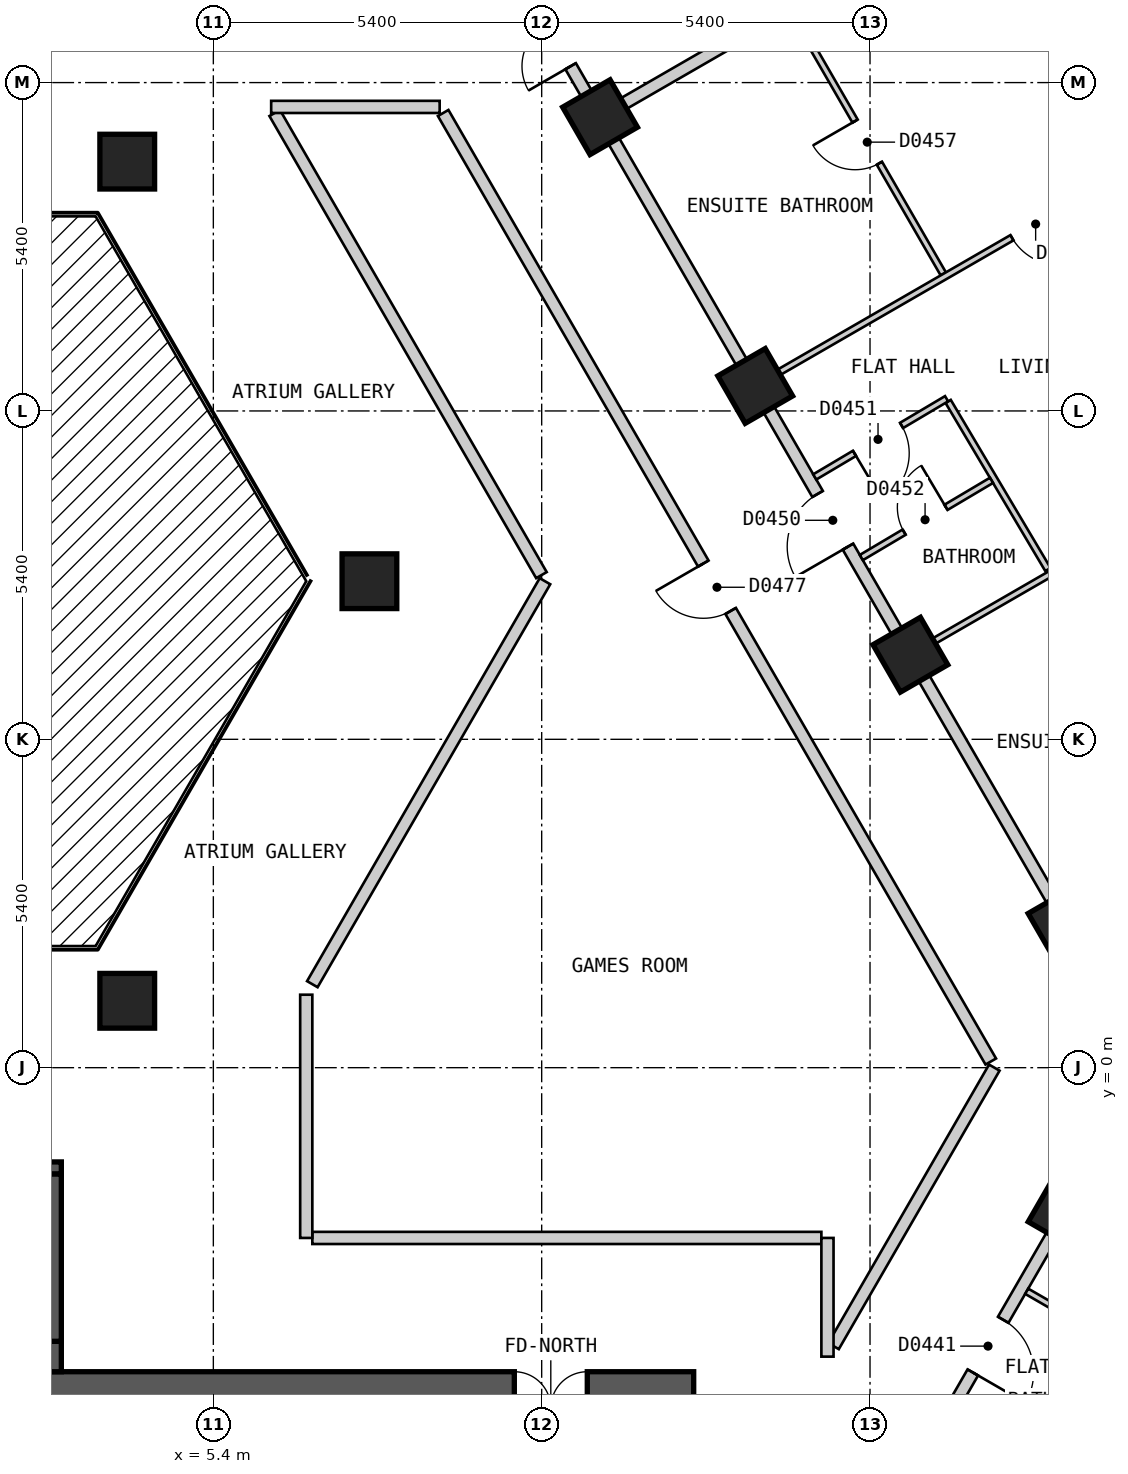
"""IFC4 building model, lengths in metres.
Left out: names, types, materials, properties, quantities, classifications, styles, units other than length and angle.
Written with IfcOpenShell. Run it as: python <this file> out.ifc"""

import sys

from ifc_helpers import new_model, si_unit, direction, frame, frame_2d, origin, origin_2d, place, context, subcontext, project, spatial, polyline, rectangle, outline, extrude, element, fill, save


model = new_model("IFC4")
c1 = context("Model", 3, precision=1e-05, world=origin(), true_north=direction((0.0, 1.0)))
c2 = subcontext(c1, "Body", "Model", "MODEL_VIEW")
j1 = project(units=[si_unit("LENGTHUNIT", "METRE"), si_unit("PLANEANGLEUNIT", "RADIAN")], contexts=[c1])
p1 = place(None, origin())
s1 = spatial("IfcSite", under=j1, at=p1, CompositionType="ELEMENT")
p2 = place(p1, origin())
s2 = spatial("IfcBuilding", under=s1, at=p2, CompositionType="ELEMENT")
p3 = place(p2, frame((0.0, 0.0, 38.4)))
s3 = spatial("IfcBuildingStorey", under=s2, at=p3, CompositionType="ELEMENT", Elevation=38.4)
for number, where, z_axis, x_axis in (
    (1, (19.417, -2.369, 0.0), (0.0, 0.0, 1.0), (0.5, 0.866, 0.0)),
    (2, (19.416, 2.371, 0.0), (0.0, 0.0, 1.0), (-0.5, 0.866, 0.0)),
    (3, (3.984, 1.1, 0.0), (0.0, 0.0, 1.0), (1.0, 0.0, 0.0)),
    (4, (16.864, 6.791, 0.0), (0.0, 0.0, 1.0), (-0.5, 0.866, 0.0)),
    (5, (14.312, 11.211, 0.0), (0.0, 0.0, 1.0), (-0.5, 0.866, 0.0)),
    (6, (7.967, 8.0, 0.0), (0.0, 0.0, 1.0), (1.0, 0.0, 0.0)),
    (7, (11.76, 15.631, 0.0), (0.0, 0.0, 1.0), (-0.5, 0.866, 0.0)),
    (8, (3.984, 14.9, 0.0), (0.0, 0.0, 1.0), (1.0, 0.0, 0.0)),
):
    element("IfcColumn", number, at=place(p3, frame(where, z_axis=z_axis, x_axis=x_axis)), inside=s3, PredefinedType="COLUMN", context=c2, shape_type="SweptSolid", body=[
        extrude(rectangle(XDim=0.9, YDim=0.9, at=origin_2d()), origin(), (0.0, 0.0, 1.0), 3.0),
    ])
p4 = place(p3, frame((-13.3, -5.6, 0.0), z_axis=(0.0, 0.0, 1.0), x_axis=(1.0, 0.0, 0.0)))
e9 = element("IfcWall", 9, at=p4, inside=s3, PredefinedType="SHEAR", context=c2, shape_type="SweptSolid", body=[
    extrude(rectangle(XDim=26.6, YDim=1.2, at=frame_2d((13.3, 0.0))), origin(), (0.0, 0.0, 1.0), 2.7),
])
p5 = place(p4, frame((23.65, 0.0, 0.0)))
e10 = element("IfcOpeningElement", 10, at=p5, cuts=e9, PredefinedType="OPENING", context=c2, shape_type="SweptSolid", body=[
    extrude(rectangle(XDim=1.2, YDim=2.1, at=frame_2d((0.6, 1.05))), frame((0.0, 0.61, 0.0), z_axis=(0.0, -1.0, 0.0), x_axis=(1.0, 0.0, 0.0)), (0.0, 0.0, 1.0), 1.22),
])
p6 = place(p3, frame((17.71, -25.825, 0.0), z_axis=(0.0, 0.0, 1.0), x_axis=(0.500001938803, 0.866024284413, 0.0)))
e11 = element("IfcWall", 11, at=p6, inside=s3, PredefinedType="SOLIDWALL", context=c2, shape_type="SweptSolid", body=[
    extrude(outline(polyline([(0.0, -0.15), (27.02, -0.15), (26.94, 0.15), (0.08, 0.15), (0.0, -0.15)])), origin(), (0.0, 0.0, 1.0), 2.7),
])
p7 = place(p6, frame((2.553, 0.0, 0.15)))
e12 = element("IfcOpeningElement", 12, at=p7, cuts=e11, PredefinedType="OPENING", context=c2, shape_type="SweptSolid", body=[
    extrude(rectangle(XDim=1.5, YDim=2.1, at=frame_2d((0.75, 1.05))), frame((0.0, 0.16, 0.0), z_axis=(0.0, -1.0, 0.0), x_axis=(1.0, 0.0, 0.0)), (0.0, 0.0, 1.0), 0.32),
])
p8 = place(p6, frame((7.658, 0.0, 0.15)))
e13 = element("IfcOpeningElement", 13, at=p8, cuts=e11, PredefinedType="OPENING", context=c2, shape_type="SweptSolid", body=[
    extrude(rectangle(XDim=1.5, YDim=2.1, at=frame_2d((0.75, 1.05))), frame((0.0, 0.16, 0.0), z_axis=(0.0, -1.0, 0.0), x_axis=(1.0, 0.0, 0.0)), (0.0, 0.0, 1.0), 0.32),
])
p9 = place(p6, frame((12.761, 0.0, 0.15)))
e14 = element("IfcOpeningElement", 14, at=p9, cuts=e11, PredefinedType="OPENING", context=c2, shape_type="SweptSolid", body=[
    extrude(rectangle(XDim=1.5, YDim=2.1, at=frame_2d((0.75, 1.05))), frame((0.0, 0.16, 0.0), z_axis=(0.0, -1.0, 0.0), x_axis=(1.0, 0.0, 0.0)), (0.0, 0.0, 1.0), 0.32),
])
p10 = place(p6, frame((17.865, 0.0, 0.15)))
e15 = element("IfcOpeningElement", 15, at=p10, cuts=e11, PredefinedType="OPENING", context=c2, shape_type="SweptSolid", body=[
    extrude(rectangle(XDim=1.5, YDim=2.1, at=frame_2d((0.75, 1.05))), frame((0.0, 0.16, 0.0), z_axis=(0.0, -1.0, 0.0), x_axis=(1.0, 0.0, 0.0)), (0.0, 0.0, 1.0), 0.32),
])
p11 = place(p6, frame((22.969, 0.0, 0.15)))
e16 = element("IfcOpeningElement", 16, at=p11, cuts=e11, PredefinedType="OPENING", context=c2, shape_type="SweptSolid", body=[
    extrude(rectangle(XDim=1.5, YDim=2.1, at=frame_2d((0.75, 1.05))), frame((0.0, 0.16, 0.0), z_axis=(0.0, -1.0, 0.0), x_axis=(1.0, 0.0, 0.0)), (0.0, 0.0, 1.0), 0.32),
])
p12 = place(p3, frame((31.22, 2.425, 0.0), z_axis=(0.0, 0.0, 1.0), x_axis=(-0.500001938803, 0.866024284413, 0.0)))
e17 = element("IfcWall", 17, at=p12, inside=s3, PredefinedType="SOLIDWALL", context=c2, shape_type="SweptSolid", body=[
    extrude(outline(polyline([(0.0, -0.15), (27.02, -0.15), (26.94, 0.15), (0.08, 0.15), (0.0, -0.15)])), origin(), (0.0, 0.0, 1.0), 2.7),
])
p13 = place(p12, frame((2.553, 0.0, 0.15)))
e18 = element("IfcOpeningElement", 18, at=p13, cuts=e17, PredefinedType="OPENING", context=c2, shape_type="SweptSolid", body=[
    extrude(rectangle(XDim=1.5, YDim=2.1, at=frame_2d((0.75, 1.05))), frame((0.0, 0.16, 0.0), z_axis=(0.0, -1.0, 0.0), x_axis=(1.0, 0.0, 0.0)), (0.0, 0.0, 1.0), 0.32),
])
p14 = place(p12, frame((7.657, 0.0, 0.15)))
e19 = element("IfcOpeningElement", 19, at=p14, cuts=e17, PredefinedType="OPENING", context=c2, shape_type="SweptSolid", body=[
    extrude(rectangle(XDim=1.5, YDim=2.1, at=frame_2d((0.75, 1.05))), frame((0.0, 0.16, 0.0), z_axis=(0.0, -1.0, 0.0), x_axis=(1.0, 0.0, 0.0)), (0.0, 0.0, 1.0), 0.32),
])
p15 = place(p12, frame((12.761, 0.0, 0.15)))
e20 = element("IfcOpeningElement", 20, at=p15, cuts=e17, PredefinedType="OPENING", context=c2, shape_type="SweptSolid", body=[
    extrude(rectangle(XDim=1.5, YDim=2.1, at=frame_2d((0.75, 1.05))), frame((0.0, 0.16, 0.0), z_axis=(0.0, -1.0, 0.0), x_axis=(1.0, 0.0, 0.0)), (0.0, 0.0, 1.0), 0.32),
])
p16 = place(p12, frame((17.865, 0.0, 0.15)))
e21 = element("IfcOpeningElement", 21, at=p16, cuts=e17, PredefinedType="OPENING", context=c2, shape_type="SweptSolid", body=[
    extrude(rectangle(XDim=1.5, YDim=2.1, at=frame_2d((0.75, 1.05))), frame((0.0, 0.16, 0.0), z_axis=(0.0, -1.0, 0.0), x_axis=(1.0, 0.0, 0.0)), (0.0, 0.0, 1.0), 0.32),
])
p17 = place(p12, frame((22.969, 0.0, 0.15)))
e22 = element("IfcOpeningElement", 22, at=p17, cuts=e17, PredefinedType="OPENING", context=c2, shape_type="SweptSolid", body=[
    extrude(rectangle(XDim=1.5, YDim=2.1, at=frame_2d((0.75, 1.05))), frame((0.0, 0.16, 0.0), z_axis=(0.0, -1.0, 0.0), x_axis=(1.0, 0.0, 0.0)), (0.0, 0.0, 1.0), 0.32),
])
p18 = place(p3, frame((-2.9, -4.75, 0.0), z_axis=(0.0, 0.0, 1.0), x_axis=(1.0, 0.0, 0.0)))
e23 = element("IfcWall", 23, at=p18, inside=s3, PredefinedType="SOLIDWALL", context=c2, shape_type="SweptSolid", body=[
    extrude(rectangle(XDim=5.8, YDim=0.5, at=frame_2d((2.9, 0.0))), origin(), (0.0, 0.0, 1.0), 2.7),
])
p19 = place(p3, frame((-2.9, -1.65, 0.0), z_axis=(0.0, 0.0, 1.0), x_axis=(1.0, 0.0, 0.0)))
e24 = element("IfcWall", 24, at=p19, inside=s3, PredefinedType="SOLIDWALL", context=c2, shape_type="SweptSolid", body=[
    extrude(rectangle(XDim=5.8, YDim=0.2, at=frame_2d((2.9, 0.0))), origin(), (0.0, 0.0, 1.0), 2.7),
])
p20 = place(p19, frame((0.3, 0.0, 0.0)))
e25 = element("IfcOpeningElement", 25, at=p20, cuts=e24, PredefinedType="OPENING", context=c2, shape_type="SweptSolid", body=[
    extrude(rectangle(XDim=1.2, YDim=2.1, at=frame_2d((0.6, 1.05))), frame((0.0, 0.11, 0.0), z_axis=(0.0, -1.0, 0.0), x_axis=(1.0, 0.0, 0.0)), (0.0, 0.0, 1.0), 0.22),
])
p21 = place(p3, frame((2.8, -4.5, 0.0), z_axis=(0.0, 0.0, 1.0), x_axis=(0.0, 1.0, 0.0)))
e26 = element("IfcWall", 26, at=p21, inside=s3, PredefinedType="SOLIDWALL", context=c2, shape_type="SweptSolid", body=[
    extrude(rectangle(XDim=2.75, YDim=0.2, at=frame_2d((1.375, 0.0))), origin(), (0.0, 0.0, 1.0), 2.7),
])
p22 = place(p3, frame((6.409, 15.7, 0.0), z_axis=(0.0, 0.0, 1.0), x_axis=(0.499930377127, -0.866065596838, 0.0)))
e27 = element("IfcWall", 27, at=p22, inside=s3, PredefinedType="PARTITIONING", context=c2, shape_type="SweptSolid", body=[
    extrude(rectangle(XDim=8.775, YDim=0.2, at=frame_2d((4.388, 0.0))), origin(), (0.0, 0.0, 1.0), 2.7),
])
p23 = place(p3, frame((9.18, 15.7, 0.0), z_axis=(0.0, 0.0, 1.0), x_axis=(0.500003652032, -0.866023295272, 0.0)))
e28 = element("IfcWall", 28, at=p23, inside=s3, PredefinedType="PARTITIONING", context=c2, shape_type="SweptSolid", body=[
    extrude(rectangle(XDim=18.012, YDim=0.2, at=frame_2d((9.006, 0.0))), origin(), (0.0, 0.0, 1.0), 2.7),
])
p24 = place(p23, frame((8.556, 0.0, 0.0)))
e29 = element("IfcOpeningElement", 29, at=p24, cuts=e28, PredefinedType="OPENING", context=c2, shape_type="SweptSolid", body=[
    extrude(rectangle(XDim=0.9, YDim=2.1, at=frame_2d((0.45, 1.05))), frame((0.0, 0.11, 0.0), z_axis=(0.0, -1.0, 0.0), x_axis=(1.0, 0.0, 0.0)), (0.0, 0.0, 1.0), 0.22),
])
p25 = place(p3, frame((10.45, 17.9, 0.0), z_axis=(0.0, 0.0, 1.0), x_axis=(0.500034352617, -0.866005569383, 0.0)))
e30 = element("IfcWall", 30, at=p25, inside=s3, PredefinedType="PARTITIONING", context=c2, shape_type="SweptSolid", body=[
    extrude(rectangle(XDim=20.553, YDim=0.2, at=frame_2d((10.276, 0.0))), origin(), (0.0, 0.0, 1.0), 2.7),
])
p26 = place(p25, frame((9.775, 0.0, 0.0)))
e31 = element("IfcOpeningElement", 31, at=p26, cuts=e30, PredefinedType="OPENING", context=c2, shape_type="SweptSolid", body=[
    extrude(rectangle(XDim=1.0, YDim=2.1, at=frame_2d((0.5, 1.05))), frame((0.0, 0.11, 0.0), z_axis=(0.0, -1.0, 0.0), x_axis=(1.0, 0.0, 0.0)), (0.0, 0.0, 1.0), 0.22),
])
p27 = place(p25, frame((0.852, 0.0, 0.0)))
e32 = element("IfcOpeningElement", 32, at=p27, cuts=e30, PredefinedType="OPENING", context=c2, shape_type="SweptSolid", body=[
    extrude(rectangle(XDim=0.8, YDim=2.1, at=frame_2d((0.4, 1.05))), frame((0.0, 0.11, 0.0), z_axis=(0.0, -1.0, 0.0), x_axis=(1.0, 0.0, 0.0)), (0.0, 0.0, 1.0), 0.22),
])
p28 = place(p3, frame((7.028, -2.8, 0.0), z_axis=(0.0, 0.0, 1.0), x_axis=(1.0, 0.0, 0.0)))
e33 = element("IfcWall", 33, at=p28, inside=s3, PredefinedType="PARTITIONING", context=c2, shape_type="SweptSolid", body=[
    extrude(rectangle(XDim=8.372, YDim=0.2, at=frame_2d((4.186, 0.0))), origin(), (0.0, 0.0, 1.0), 2.7),
])
p29 = place(p3, frame((6.351, 15.8, 0.0), z_axis=(0.0, 0.0, 1.0), x_axis=(1.0, 0.0, 0.0)))
e34 = element("IfcWall", 34, at=p29, inside=s3, PredefinedType="PARTITIONING", context=c2, shape_type="SweptSolid", body=[
    extrude(rectangle(XDim=2.771, YDim=0.2, at=frame_2d((1.385, 0.0))), origin(), (0.0, 0.0, 1.0), 2.7),
])
p30 = place(p3, frame((7.028, 1.373, 0.0), z_axis=(0.0, 0.0, 1.0), x_axis=(0.49998574534, 0.86603363356, 0.0)))
e35 = element("IfcWall", 35, at=p30, inside=s3, PredefinedType="PARTITIONING", context=c2, shape_type="SweptSolid", body=[
    extrude(rectangle(XDim=7.652, YDim=0.2, at=frame_2d((3.826, 0.0))), origin(), (0.0, 0.0, 1.0), 2.7),
])
p31 = place(p3, frame((15.6, -4.579, 0.0), z_axis=(0.0, 0.0, 1.0), x_axis=(0.499927597274, 0.866067201483, 0.0)))
e36 = element("IfcWall", 36, at=p31, inside=s3, PredefinedType="PARTITIONING", context=c2, shape_type="SweptSolid", body=[
    extrude(rectangle(XDim=5.288, YDim=0.2, at=frame_2d((2.644, 0.0))), origin(), (0.0, 0.0, 1.0), 2.7),
])
p32 = place(p3, frame((15.707, -8.794, 0.0), z_axis=(0.0, 0.0, 1.0), x_axis=(0.500016151272, 0.866016078642, 0.0)))
e37 = element("IfcWall", 37, at=p32, inside=s3, PredefinedType="PARTITIONING", context=c2, shape_type="SweptSolid", body=[
    extrude(rectangle(XDim=10.098, YDim=0.2, at=frame_2d((5.049, 0.0))), origin(), (0.0, 0.0, 1.0), 2.7),
])
p33 = place(p32, frame((4.367, 0.0, 0.0)))
e38 = element("IfcOpeningElement", 38, at=p33, cuts=e37, PredefinedType="OPENING", context=c2, shape_type="SweptSolid", body=[
    extrude(rectangle(XDim=1.0, YDim=2.1, at=frame_2d((0.5, 1.05))), frame((0.0, 0.11, 0.0), z_axis=(0.0, -1.0, 0.0), x_axis=(1.0, 0.0, 0.0)), (0.0, 0.0, 1.0), 0.22),
])
p34 = place(p3, frame((6.928, -2.8, 0.0), z_axis=(0.0, 0.0, 1.0), x_axis=(0.0, 1.0, 0.0)))
e39 = element("IfcWall", 39, at=p34, inside=s3, PredefinedType="PARTITIONING", context=c2, shape_type="SweptSolid", body=[
    extrude(rectangle(XDim=4.0, YDim=0.2, at=frame_2d((2.0, 0.0))), origin(), (0.0, 0.0, 1.0), 2.7),
])
p35 = place(p3, frame((15.5, -4.752, 0.0), z_axis=(0.0, 0.0, 1.0), x_axis=(0.0, 1.0, 0.0)))
e40 = element("IfcWall", 40, at=p35, inside=s3, PredefinedType="PARTITIONING", context=c2, shape_type="SweptSolid", body=[
    extrude(rectangle(XDim=1.952, YDim=0.2, at=frame_2d((0.976, 0.0))), origin(), (0.0, 0.0, 1.0), 2.7),
])
p36 = place(p3, frame((17.485, 10.957, 0.0), z_axis=(0.0, 0.0, 1.0), x_axis=(0.510324709283, -0.859981796956, 0.0)))
e41 = element("IfcWall", 41, at=p36, inside=s3, PredefinedType="PARTITIONING", context=c2, shape_type="SweptSolid", body=[
    extrude(rectangle(XDim=3.215, YDim=0.1, at=frame_2d((1.608, 0.0))), origin(), (0.0, 0.0, 1.0), 2.7),
])
p37 = place(p3, frame((14.928, 17.344, 0.0), z_axis=(0.0, 0.0, 1.0), x_axis=(0.500029609304, -0.86600830817, 0.0)))
e42 = element("IfcWall", 42, at=p37, inside=s3, PredefinedType="PARTITIONING", context=c2, shape_type="SweptSolid", body=[
    extrude(rectangle(XDim=4.954, YDim=0.1, at=frame_2d((2.477, 0.0))), origin(), (0.0, 0.0, 1.0), 2.7),
])
p38 = place(p37, frame((2.052, 0.0, 0.0)))
e43 = element("IfcOpeningElement", 43, at=p38, cuts=e42, PredefinedType="OPENING", context=c2, shape_type="SweptSolid", body=[
    extrude(rectangle(XDim=0.8, YDim=2.1, at=frame_2d((0.4, 1.05))), frame((0.0, 0.06, 0.0), z_axis=(0.0, -1.0, 0.0), x_axis=(1.0, 0.0, 0.0)), (0.0, 0.0, 1.0), 0.12),
])
p39 = place(p3, frame((18.777, -3.677, 0.0), z_axis=(0.0, 0.0, 1.0), x_axis=(0.866000843773, -0.500042536776, 0.0)))
e44 = element("IfcWall", 44, at=p39, inside=s3, PredefinedType="PARTITIONING", context=c2, shape_type="SweptSolid", body=[
    extrude(rectangle(XDim=4.05, YDim=0.1, at=frame_2d((2.025, 0.0))), origin(), (0.0, 0.0, 1.0), 2.7),
])
p40 = place(p39, frame((1.55, 0.0, 0.0)))
e45 = element("IfcOpeningElement", 45, at=p40, cuts=e44, PredefinedType="OPENING", context=c2, shape_type="SweptSolid", body=[
    extrude(rectangle(XDim=0.9, YDim=2.1, at=frame_2d((0.45, 1.05))), frame((0.0, 0.06, 0.0), z_axis=(0.0, -1.0, 0.0), x_axis=(1.0, 0.0, 0.0)), (0.0, 0.0, 1.0), 0.12),
])
p41 = place(p3, frame((16.95, 6.841, 0.0), z_axis=(0.0, 0.0, 1.0), x_axis=(0.866022959057, 0.500004234368, 0.0)))
e46 = element("IfcWall", 46, at=p41, inside=s3, PredefinedType="PARTITIONING", context=c2, shape_type="SweptSolid", body=[
    extrude(rectangle(XDim=10.0, YDim=0.1, at=frame_2d((5.0, 0.0))), origin(), (0.0, 0.0, 1.0), 2.7),
])
p42 = place(p41, frame((4.795, 0.0, 0.0)))
e47 = element("IfcOpeningElement", 47, at=p42, cuts=e46, PredefinedType="OPENING", context=c2, shape_type="SweptSolid", body=[
    extrude(rectangle(XDim=0.9, YDim=2.1, at=frame_2d((0.45, 1.05))), frame((0.0, 0.06, 0.0), z_axis=(0.0, -1.0, 0.0), x_axis=(1.0, 0.0, 0.0)), (0.0, 0.0, 1.0), 0.12),
])
p43 = place(p3, frame((14.399, 11.261, 0.0), z_axis=(0.0, 0.0, 1.0), x_axis=(0.866022959057, 0.500004234368, 0.0)))
e48 = element("IfcWall", 48, at=p43, inside=s3, PredefinedType="PARTITIONING", context=c2, shape_type="SweptSolid", body=[
    extrude(rectangle(XDim=10.0, YDim=0.1, at=frame_2d((5.0, 0.0))), origin(), (0.0, 0.0, 1.0), 2.7),
])
p44 = place(p43, frame((4.775, 0.0, 0.0)))
e49 = element("IfcOpeningElement", 49, at=p44, cuts=e48, PredefinedType="OPENING", context=c2, shape_type="SweptSolid", body=[
    extrude(rectangle(XDim=0.9, YDim=2.1, at=frame_2d((0.45, 1.05))), frame((0.0, 0.06, 0.0), z_axis=(0.0, -1.0, 0.0), x_axis=(1.0, 0.0, 0.0)), (0.0, 0.0, 1.0), 0.12),
])
p45 = place(p3, frame((16.057, 8.389, 0.0), z_axis=(0.0, 0.0, 1.0), x_axis=(0.860077993161, 0.510162567893, 0.0)))
e50 = element("IfcWall", 50, at=p45, inside=s3, PredefinedType="PARTITIONING", context=c2, shape_type="SweptSolid", body=[
    extrude(rectangle(XDim=2.49, YDim=0.1, at=frame_2d((1.245, 0.0))), origin(), (0.0, 0.0, 1.0), 2.7),
])
p46 = place(p45, frame((0.819, 0.0, 0.0)))
e51 = element("IfcOpeningElement", 51, at=p46, cuts=e50, PredefinedType="OPENING", context=c2, shape_type="SweptSolid", body=[
    extrude(rectangle(XDim=0.8, YDim=2.1, at=frame_2d((0.4, 1.05))), frame((0.0, 0.06, 0.0), z_axis=(0.0, -1.0, 0.0), x_axis=(1.0, 0.0, 0.0)), (0.0, 0.0, 1.0), 0.12),
])
p47 = place(p3, frame((15.291, 9.715, 0.0), z_axis=(0.0, 0.0, 1.0), x_axis=(0.860088508644, 0.51014483953, 0.0)))
e52 = element("IfcWall", 52, at=p47, inside=s3, PredefinedType="PARTITIONING", context=c2, shape_type="SweptSolid", body=[
    extrude(rectangle(XDim=2.521, YDim=0.1, at=frame_2d((1.26, 0.0))), origin(), (0.0, 0.0, 1.0), 2.7),
])
p48 = place(p47, frame((0.76, 0.0, 0.0)))
e53 = element("IfcOpeningElement", 53, at=p48, cuts=e52, PredefinedType="OPENING", context=c2, shape_type="SweptSolid", body=[
    extrude(rectangle(XDim=0.9, YDim=2.1, at=frame_2d((0.45, 1.05))), frame((0.0, 0.06, 0.0), z_axis=(0.0, -1.0, 0.0), x_axis=(1.0, 0.0, 0.0)), (0.0, 0.0, 1.0), 0.12),
])
p49 = place(p3, frame((11.847, 15.681, 0.0), z_axis=(0.0, 0.0, 1.0), x_axis=(0.866022959057, 0.500004234368, 0.0)))
e54 = element("IfcWall", 54, at=p49, inside=s3, PredefinedType="PARTITIONING", context=c2, shape_type="SweptSolid", body=[
    extrude(rectangle(XDim=10.0, YDim=0.2, at=frame_2d((5.0, 0.0))), origin(), (0.0, 0.0, 1.0), 2.7),
])
p50 = place(p33, origin())
e55 = element("IfcDoor", 55, at=p50, inside=s3, OperationType="SINGLE_SWING_LEFT", PredefinedType="DOOR", context=c2, shape_type="SweptSolid", body=[
    extrude(rectangle(XDim=1.0, YDim=2.1, at=frame_2d((0.5, 1.05))), frame((0.0, 0.025, 0.0), z_axis=(0.0, -1.0, 0.0), x_axis=(1.0, 0.0, 0.0)), (0.0, 0.0, 1.0), 0.05),
])
fill(e38, e55)
p51 = place(p26, origin())
e56 = element("IfcDoor", 56, at=p51, inside=s3, OperationType="SINGLE_SWING_RIGHT", PredefinedType="DOOR", context=c2, shape_type="SweptSolid", body=[
    extrude(rectangle(XDim=1.0, YDim=2.1, at=frame_2d((0.5, 1.05))), frame((0.0, 0.025, 0.0), z_axis=(0.0, -1.0, 0.0), x_axis=(1.0, 0.0, 0.0)), (0.0, 0.0, 1.0), 0.05),
])
fill(e31, e56)
p52 = place(p48, origin())
e57 = element("IfcDoor", 57, at=p52, inside=s3, OperationType="SINGLE_SWING_LEFT", PredefinedType="DOOR", context=c2, shape_type="SweptSolid", body=[
    extrude(rectangle(XDim=0.9, YDim=2.1, at=frame_2d((0.45, 1.05))), frame((0.0, 0.025, 0.0), z_axis=(0.0, -1.0, 0.0), x_axis=(1.0, 0.0, 0.0)), (0.0, 0.0, 1.0), 0.05),
])
fill(e53, e57)
p53 = place(p46, origin())
e58 = element("IfcDoor", 58, at=p53, inside=s3, OperationType="SINGLE_SWING_RIGHT", PredefinedType="DOOR", context=c2, shape_type="SweptSolid", body=[
    extrude(rectangle(XDim=0.8, YDim=2.1, at=frame_2d((0.4, 1.05))), frame((0.0, 0.025, 0.0), z_axis=(0.0, -1.0, 0.0), x_axis=(1.0, 0.0, 0.0)), (0.0, 0.0, 1.0), 0.05),
])
fill(e51, e58)
p54 = place(p44, origin())
e59 = element("IfcDoor", 59, at=p54, inside=s3, OperationType="SINGLE_SWING_RIGHT", PredefinedType="DOOR", context=c2, shape_type="SweptSolid", body=[
    extrude(rectangle(XDim=0.9, YDim=2.1, at=frame_2d((0.45, 1.05))), frame((0.0, 0.025, 0.0), z_axis=(0.0, -1.0, 0.0), x_axis=(1.0, 0.0, 0.0)), (0.0, 0.0, 1.0), 0.05),
])
fill(e49, e59)
p55 = place(p38, origin())
e60 = element("IfcDoor", 60, at=p55, inside=s3, OperationType="SINGLE_SWING_LEFT", PredefinedType="DOOR", context=c2, shape_type="SweptSolid", body=[
    extrude(rectangle(XDim=0.8, YDim=2.1, at=frame_2d((0.4, 1.05))), frame((0.0, 0.025, 0.0), z_axis=(0.0, -1.0, 0.0), x_axis=(1.0, 0.0, 0.0)), (0.0, 0.0, 1.0), 0.05),
])
fill(e43, e60)
p56 = place(p27, origin())
e61 = element("IfcDoor", 61, at=p56, inside=s3, OperationType="SINGLE_SWING_RIGHT", PredefinedType="DOOR", context=c2, shape_type="SweptSolid", body=[
    extrude(rectangle(XDim=0.8, YDim=2.1, at=frame_2d((0.4, 1.05))), frame((0.0, 0.025, 0.0), z_axis=(0.0, -1.0, 0.0), x_axis=(1.0, 0.0, 0.0)), (0.0, 0.0, 1.0), 0.05),
])
fill(e32, e61)
p57 = place(p24, origin())
e62 = element("IfcDoor", 62, at=p57, inside=s3, OperationType="SINGLE_SWING_LEFT", PredefinedType="DOOR", context=c2, shape_type="SweptSolid", body=[
    extrude(rectangle(XDim=0.9, YDim=2.1, at=frame_2d((0.45, 1.05))), frame((0.0, 0.025, 0.0), z_axis=(0.0, -1.0, 0.0), x_axis=(1.0, 0.0, 0.0)), (0.0, 0.0, 1.0), 0.05),
])
fill(e29, e62)
save(model, sys.argv[1])
